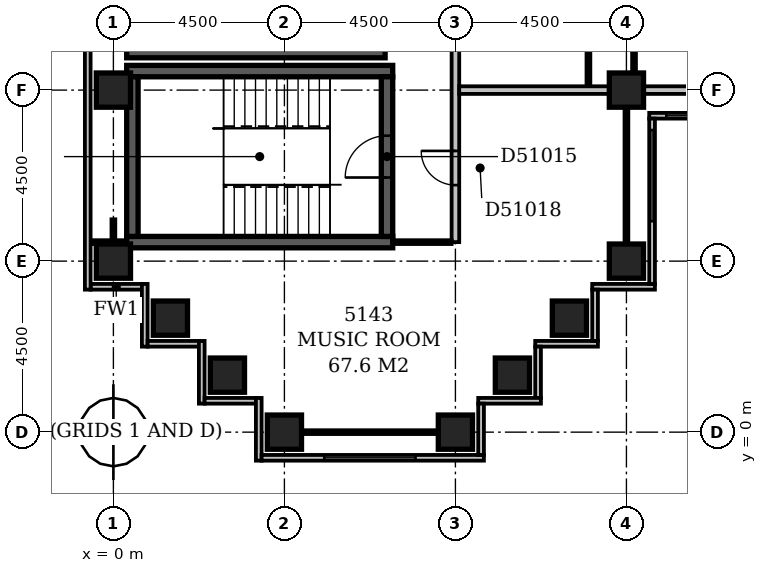
"""IFC4 building model, lengths in metres.
Left out: names, types, materials, properties, quantities, classifications, styles, units other than length and angle.
Written with IfcOpenShell. Run it as: python <this file> out.ifc"""

import sys

from ifc_helpers import new_model, si_unit, direction, frame, frame_2d, origin, origin_2d, place, context, subcontext, project, spatial, rectangle, extrude, element, fill, save


model = new_model("IFC4")
c1 = context("Model", 3, precision=1e-05, world=origin(), true_north=direction((0.0, 1.0)))
c2 = subcontext(c1, "Body", "Model", "MODEL_VIEW")
j1 = project(units=[si_unit("LENGTHUNIT", "METRE"), si_unit("PLANEANGLEUNIT", "RADIAN")], contexts=[c1])
p1 = place(None, origin())
s1 = spatial("IfcSite", under=j1, at=p1, CompositionType="ELEMENT")
p2 = place(p1, origin())
s2 = spatial("IfcBuilding", under=s1, at=p2, CompositionType="ELEMENT")
p3 = place(p2, frame((0.0, 0.0, 200.6)))
s3 = spatial("IfcBuildingStorey", under=s2, at=p3, CompositionType="ELEMENT", Elevation=200.6)
for number, where, z_axis, x_axis in (
    (1, (0.35, 5.0, -0.3), (0.0, 0.0, 1.0), (1.0, 0.0, 0.0)),
    (2, (0.35, 9.5, -0.3), (0.0, 0.0, 1.0), (1.0, 0.0, 0.0)),
):
    element("IfcWall", number, at=place(p3, frame(where, z_axis=z_axis, x_axis=x_axis)), inside=s3, PredefinedType="SHEAR", context=c2, shape_type="SweptSolid", body=[
        extrude(rectangle(XDim=7.0, YDim=0.3, at=frame_2d((3.5, 0.0))), origin(), (0.0, 0.0, 1.0), 3.6),
    ])
p4 = place(p3, frame((0.35, 10.0, -0.3), z_axis=(0.0, 0.0, 1.0), x_axis=(1.0, 0.0, 0.0)))
e3 = element("IfcWall", 3, at=p4, inside=s3, PredefinedType="SHEAR", context=c2, shape_type="SweptSolid", body=[
    extrude(rectangle(XDim=6.8, YDim=0.3, at=frame_2d((3.4, 0.0))), origin(), (0.0, 0.0, 1.0), 3.6),
])
p5 = place(p3, frame((0.5, 5.15, -0.3), z_axis=(0.0, 0.0, 1.0), x_axis=(0.0, 1.0, 0.0)))
e4 = element("IfcWall", 4, at=p5, inside=s3, PredefinedType="SHEAR", context=c2, shape_type="SweptSolid", body=[
    extrude(rectangle(XDim=4.2, YDim=0.3, at=frame_2d((2.1, 0.0))), origin(), (0.0, 0.0, 1.0), 3.6),
])
p6 = place(p3, frame((7.2, 5.15, -0.3), z_axis=(0.0, 0.0, 1.0), x_axis=(0.0, 1.0, 0.0)))
e5 = element("IfcWall", 5, at=p6, inside=s3, PredefinedType="SHEAR", context=c2, shape_type="SweptSolid", body=[
    extrude(rectangle(XDim=4.2, YDim=0.3, at=frame_2d((2.1, 0.0))), origin(), (0.0, 0.0, 1.0), 3.6),
])
p7 = place(p6, frame((1.55, 0.0, 0.3)))
e6 = element("IfcOpeningElement", 6, at=p7, cuts=e5, PredefinedType="OPENING", context=c2, shape_type="SweptSolid", body=[
    extrude(rectangle(XDim=1.1, YDim=2.1, at=frame_2d((0.55, 1.05))), frame((0.0, 0.162, 0.0), z_axis=(0.0, -1.0, 0.0), x_axis=(1.0, 0.0, 0.0)), (0.0, 0.0, 1.0), 0.324),
])
for number, where, z_axis, x_axis in (
    (7, (4.5, 0.0, -0.3), (0.0, 0.0, 1.0), (1.0, 0.0, 0.0)),
    (8, (9.0, 0.0, -0.3), (0.0, 0.0, 1.0), (1.0, 0.0, 0.0)),
    (9, (3.0, 1.5, -0.3), (0.0, 0.0, 1.0), (1.0, 0.0, 0.0)),
    (10, (10.5, 1.5, -0.3), (0.0, 0.0, 1.0), (1.0, 0.0, 0.0)),
    (11, (1.5, 3.0, -0.3), (0.0, 0.0, 1.0), (1.0, 0.0, 0.0)),
    (12, (12.0, 3.0, -0.3), (0.0, 0.0, 1.0), (1.0, 0.0, 0.0)),
    (13, (0.0, 4.5, -0.3), (0.0, 0.0, 1.0), (1.0, 0.0, 0.0)),
    (14, (13.5, 4.5, -0.3), (0.0, 0.0, 1.0), (1.0, 0.0, 0.0)),
    (15, (0.0, 9.0, -0.3), (0.0, 0.0, 1.0), (1.0, 0.0, 0.0)),
    (16, (13.5, 9.0, -0.3), (0.0, 0.0, 1.0), (1.0, 0.0, 0.0)),
):
    element("IfcColumn", number, at=place(p3, frame(where, z_axis=z_axis, x_axis=x_axis)), inside=s3, PredefinedType="COLUMN", context=c2, shape_type="SweptSolid", body=[
        extrude(rectangle(XDim=0.9, YDim=0.9, at=origin_2d()), origin(), (0.0, 0.0, 1.0), 3.6),
    ])
p8 = place(p3, frame((-0.6, 3.825, 0.0), z_axis=(0.0, 0.0, 1.0), x_axis=(1.0, 0.0, 0.0)))
e17 = element("IfcWall", 17, at=p8, inside=s3, PredefinedType="STANDARD", context=c2, shape_type="SweptSolid", body=[
    extrude(rectangle(XDim=1.35, YDim=0.15, at=frame_2d((0.675, 0.0))), origin(), (0.0, 0.0, 1.0), 2.7),
])
p9 = place(p3, frame((0.825, 3.9, 0.0), z_axis=(0.0, 0.0, 1.0), x_axis=(0.0, -1.0, 0.0)))
e18 = element("IfcWall", 18, at=p9, inside=s3, PredefinedType="STANDARD", context=c2, shape_type="SweptSolid", body=[
    extrude(rectangle(XDim=1.65, YDim=0.15, at=frame_2d((0.825, 0.0))), origin(), (0.0, 0.0, 1.0), 2.7),
])
p10 = place(p3, frame((0.9, 2.325, 0.0), z_axis=(0.0, 0.0, 1.0), x_axis=(1.0, 0.0, 0.0)))
e19 = element("IfcWall", 19, at=p10, inside=s3, PredefinedType="STANDARD", context=c2, shape_type="SweptSolid", body=[
    extrude(rectangle(XDim=1.35, YDim=0.15, at=frame_2d((0.675, 0.0))), origin(), (0.0, 0.0, 1.0), 2.7),
])
p11 = place(p3, frame((2.325, 2.4, 0.0), z_axis=(0.0, 0.0, 1.0), x_axis=(0.0, -1.0, 0.0)))
e20 = element("IfcWall", 20, at=p11, inside=s3, PredefinedType="STANDARD", context=c2, shape_type="SweptSolid", body=[
    extrude(rectangle(XDim=1.65, YDim=0.15, at=frame_2d((0.825, 0.0))), origin(), (0.0, 0.0, 1.0), 2.7),
])
p12 = place(p3, frame((2.4, 0.825, 0.0), z_axis=(0.0, 0.0, 1.0), x_axis=(1.0, 0.0, 0.0)))
e21 = element("IfcWall", 21, at=p12, inside=s3, PredefinedType="STANDARD", context=c2, shape_type="SweptSolid", body=[
    extrude(rectangle(XDim=1.35, YDim=0.15, at=frame_2d((0.675, 0.0))), origin(), (0.0, 0.0, 1.0), 2.7),
])
p13 = place(p3, frame((3.825, 0.9, 0.0), z_axis=(0.0, 0.0, 1.0), x_axis=(0.0, -1.0, 0.0)))
e22 = element("IfcWall", 22, at=p13, inside=s3, PredefinedType="STANDARD", context=c2, shape_type="SweptSolid", body=[
    extrude(rectangle(XDim=1.65, YDim=0.15, at=frame_2d((0.825, 0.0))), origin(), (0.0, 0.0, 1.0), 2.7),
])
p14 = place(p3, frame((3.9, -0.675, 0.0), z_axis=(0.0, 0.0, 1.0), x_axis=(1.0, 0.0, 0.0)))
e23 = element("IfcWall", 23, at=p14, inside=s3, PredefinedType="STANDARD", context=c2, shape_type="SweptSolid", body=[
    extrude(rectangle(XDim=5.85, YDim=0.15, at=frame_2d((2.925, 0.0))), origin(), (0.0, 0.0, 1.0), 2.7),
])
p15 = place(p14, frame((1.65, 0.0, 0.6)))
e24 = element("IfcOpeningElement", 24, at=p15, cuts=e23, PredefinedType="OPENING", context=c2, shape_type="SweptSolid", body=[
    extrude(rectangle(XDim=2.4, YDim=1.8, at=frame_2d((1.2, 0.9))), frame((0.0, 0.087, 0.0), z_axis=(0.0, -1.0, 0.0), x_axis=(1.0, 0.0, 0.0)), (0.0, 0.0, 1.0), 0.174),
])
p16 = place(p3, frame((9.675, -0.6, 0.0), z_axis=(0.0, 0.0, 1.0), x_axis=(0.0, 1.0, 0.0)))
e25 = element("IfcWall", 25, at=p16, inside=s3, PredefinedType="STANDARD", context=c2, shape_type="SweptSolid", body=[
    extrude(rectangle(XDim=1.35, YDim=0.15, at=frame_2d((0.675, 0.0))), origin(), (0.0, 0.0, 1.0), 2.7),
])
p17 = place(p3, frame((9.6, 0.825, 0.0), z_axis=(0.0, 0.0, 1.0), x_axis=(1.0, 0.0, 0.0)))
e26 = element("IfcWall", 26, at=p17, inside=s3, PredefinedType="STANDARD", context=c2, shape_type="SweptSolid", body=[
    extrude(rectangle(XDim=1.65, YDim=0.15, at=frame_2d((0.825, 0.0))), origin(), (0.0, 0.0, 1.0), 2.7),
])
p18 = place(p3, frame((11.175, 0.9, 0.0), z_axis=(0.0, 0.0, 1.0), x_axis=(0.0, 1.0, 0.0)))
e27 = element("IfcWall", 27, at=p18, inside=s3, PredefinedType="STANDARD", context=c2, shape_type="SweptSolid", body=[
    extrude(rectangle(XDim=1.35, YDim=0.15, at=frame_2d((0.675, 0.0))), origin(), (0.0, 0.0, 1.0), 2.7),
])
p19 = place(p3, frame((11.1, 2.325, 0.0), z_axis=(0.0, 0.0, 1.0), x_axis=(1.0, 0.0, 0.0)))
e28 = element("IfcWall", 28, at=p19, inside=s3, PredefinedType="STANDARD", context=c2, shape_type="SweptSolid", body=[
    extrude(rectangle(XDim=1.65, YDim=0.15, at=frame_2d((0.825, 0.0))), origin(), (0.0, 0.0, 1.0), 2.7),
])
p20 = place(p3, frame((12.675, 2.4, 0.0), z_axis=(0.0, 0.0, 1.0), x_axis=(0.0, 1.0, 0.0)))
e29 = element("IfcWall", 29, at=p20, inside=s3, PredefinedType="STANDARD", context=c2, shape_type="SweptSolid", body=[
    extrude(rectangle(XDim=1.35, YDim=0.15, at=frame_2d((0.675, 0.0))), origin(), (0.0, 0.0, 1.0), 2.7),
])
p21 = place(p3, frame((12.6, 3.825, 0.0), z_axis=(0.0, 0.0, 1.0), x_axis=(1.0, 0.0, 0.0)))
e30 = element("IfcWall", 30, at=p21, inside=s3, PredefinedType="STANDARD", context=c2, shape_type="SweptSolid", body=[
    extrude(rectangle(XDim=1.65, YDim=0.15, at=frame_2d((0.825, 0.0))), origin(), (0.0, 0.0, 1.0), 2.7),
])
p22 = place(p3, frame((14.175, 3.9, 0.0), z_axis=(0.0, 0.0, 1.0), x_axis=(0.0, 1.0, 0.0)))
e31 = element("IfcWall", 31, at=p22, inside=s3, PredefinedType="STANDARD", context=c2, shape_type="SweptSolid", body=[
    extrude(rectangle(XDim=4.35, YDim=0.15, at=frame_2d((2.175, 0.0))), origin(), (0.0, 0.0, 1.0), 2.7),
])
p23 = place(p22, frame((1.65, 0.0, 0.6)))
e32 = element("IfcOpeningElement", 32, at=p23, cuts=e31, PredefinedType="OPENING", context=c2, shape_type="SweptSolid", body=[
    extrude(rectangle(XDim=2.4, YDim=1.8, at=frame_2d((1.2, 0.9))), frame((0.0, 0.087, 0.0), z_axis=(0.0, -1.0, 0.0), x_axis=(1.0, 0.0, 0.0)), (0.0, 0.0, 1.0), 0.174),
])
p24 = place(p3, frame((14.1, 8.325, 0.0), z_axis=(0.0, 0.0, 1.0), x_axis=(1.0, 0.0, 0.0)))
e33 = element("IfcWall", 33, at=p24, inside=s3, PredefinedType="STANDARD", context=c2, shape_type="SweptSolid", body=[
    extrude(rectangle(XDim=4.65, YDim=0.15, at=frame_2d((2.325, 0.0))), origin(), (0.0, 0.0, 1.0), 2.7),
])
p25 = place(p24, frame((0.45, 0.0, 0.6)))
e34 = element("IfcOpeningElement", 34, at=p25, cuts=e33, PredefinedType="OPENING", context=c2, shape_type="SweptSolid", body=[
    extrude(rectangle(XDim=2.4, YDim=1.8, at=frame_2d((1.2, 0.9))), frame((0.0, 0.087, 0.0), z_axis=(0.0, -1.0, 0.0), x_axis=(1.0, 0.0, 0.0)), (0.0, 0.0, 1.0), 0.174),
])
p26 = place(p3, frame((-0.675, 59.1, 0.0), z_axis=(0.0, 0.0, 1.0), x_axis=(0.0, -1.0, 0.0)))
e35 = element("IfcWall", 35, at=p26, inside=s3, PredefinedType="STANDARD", context=c2, shape_type="SweptSolid", body=[
    extrude(rectangle(XDim=55.35, YDim=0.15, at=frame_2d((27.675, 0.0))), origin(), (0.0, 0.0, 1.0), 2.7),
])
p27 = place(p3, frame((4.95, 0.0, 0.0), z_axis=(0.0, 0.0, 1.0), x_axis=(1.0, 0.0, 0.0)))
e36 = element("IfcWall", 36, at=p27, inside=s3, PredefinedType="PARTITIONING", context=c2, shape_type="SweptSolid", body=[
    extrude(rectangle(XDim=3.6, YDim=0.1, at=frame_2d((1.8, 0.0))), origin(), (0.0, 0.0, 1.0), 2.7),
])
p28 = place(p3, frame((0.0, 4.95, 0.0), z_axis=(0.0, 0.0, 1.0), x_axis=(0.0, 1.0, 0.0)))
e37 = element("IfcWall", 37, at=p28, inside=s3, PredefinedType="PARTITIONING", context=c2, shape_type="SweptSolid", body=[
    extrude(rectangle(XDim=0.65, YDim=0.1, at=frame_2d((0.325, 0.0))), origin(), (0.0, 0.0, 1.0), 2.7),
])
p29 = place(p3, frame((13.5, 4.95, 0.0), z_axis=(0.0, 0.0, 1.0), x_axis=(0.0, 1.0, 0.0)))
e38 = element("IfcWall", 38, at=p29, inside=s3, PredefinedType="PARTITIONING", context=c2, shape_type="SweptSolid", body=[
    extrude(rectangle(XDim=3.6, YDim=0.1, at=frame_2d((1.8, 0.0))), origin(), (0.0, 0.0, 1.0), 2.7),
])
p30 = place(p3, frame((-0.6, 5.0, 0.0), z_axis=(0.0, 0.0, 1.0), x_axis=(1.0, 0.0, 0.0)))
e39 = element("IfcWall", 39, at=p30, inside=s3, PredefinedType="PARTITIONING", context=c2, shape_type="SweptSolid", body=[
    extrude(rectangle(XDim=0.951, YDim=0.1, at=frame_2d((0.476, 0.0))), origin(), (0.0, 0.0, 1.0), 3.3),
])
p31 = place(p3, frame((7.349, 5.0, 0.0), z_axis=(0.0, 0.0, 1.0), x_axis=(1.0, 0.0, 0.0)))
e40 = element("IfcWall", 40, at=p31, inside=s3, PredefinedType="PARTITIONING", context=c2, shape_type="SweptSolid", body=[
    extrude(rectangle(XDim=1.551, YDim=0.1, at=frame_2d((0.775, 0.0))), origin(), (0.0, 0.0, 1.0), 3.3),
])
p32 = place(p3, frame((9.0, 5.0, 0.0), z_axis=(0.0, 0.0, 1.0), x_axis=(0.0, 1.0, 0.0)))
e41 = element("IfcWall", 41, at=p32, inside=s3, PredefinedType="PARTITIONING", context=c2, shape_type="SweptSolid", body=[
    extrude(rectangle(XDim=31.0, YDim=0.2, at=frame_2d((15.5, 0.0))), origin(), (0.0, 0.0, 1.0), 3.3),
])
p33 = place(p32, frame((18.4, 0.0, 0.0)))
e42 = element("IfcOpeningElement", 42, at=p33, cuts=e41, PredefinedType="OPENING", context=c2, shape_type="SweptSolid", body=[
    extrude(rectangle(XDim=1.0, YDim=2.1, at=frame_2d((0.5, 1.05))), frame((0.0, 0.112, 0.0), z_axis=(0.0, -1.0, 0.0), x_axis=(1.0, 0.0, 0.0)), (0.0, 0.0, 1.0), 0.224),
])
p34 = place(p32, frame((11.7, 0.0, 0.0)))
e43 = element("IfcOpeningElement", 43, at=p34, cuts=e41, PredefinedType="OPENING", context=c2, shape_type="SweptSolid", body=[
    extrude(rectangle(XDim=1.0, YDim=2.1, at=frame_2d((0.5, 1.05))), frame((0.0, 0.112, 0.0), z_axis=(0.0, -1.0, 0.0), x_axis=(1.0, 0.0, 0.0)), (0.0, 0.0, 1.0), 0.224),
])
p35 = place(p32, frame((1.5, 0.0, 0.0)))
e44 = element("IfcOpeningElement", 44, at=p35, cuts=e41, PredefinedType="OPENING", context=c2, shape_type="SweptSolid", body=[
    extrude(rectangle(XDim=0.9, YDim=2.1, at=frame_2d((0.45, 1.05))), frame((0.0, 0.112, 0.0), z_axis=(0.0, -1.0, 0.0), x_axis=(1.0, 0.0, 0.0)), (0.0, 0.0, 1.0), 0.224),
])
p36 = place(p3, frame((9.1, 9.0, 0.0), z_axis=(0.0, 0.0, 1.0), x_axis=(1.0, 0.0, 0.0)))
e45 = element("IfcWall", 45, at=p36, inside=s3, PredefinedType="PARTITIONING", context=c2, shape_type="SweptSolid", body=[
    extrude(rectangle(XDim=3.95, YDim=0.2, at=frame_2d((1.975, 0.0))), origin(), (0.0, 0.0, 1.0), 3.3),
])
p37 = place(p3, frame((13.95, 9.0, 0.0), z_axis=(0.0, 0.0, 1.0), x_axis=(1.0, 0.0, 0.0)))
e46 = element("IfcWall", 46, at=p37, inside=s3, PredefinedType="PARTITIONING", context=c2, shape_type="SweptSolid", body=[
    extrude(rectangle(XDim=3.6, YDim=0.2, at=frame_2d((1.8, 0.0))), origin(), (0.0, 0.0, 1.0), 2.7),
])
p38 = place(p3, frame((12.5, 9.1, 0.0), z_axis=(0.0, 0.0, 1.0), x_axis=(0.0, 1.0, 0.0)))
e47 = element("IfcWall", 47, at=p38, inside=s3, PredefinedType="PARTITIONING", context=c2, shape_type="SweptSolid", body=[
    extrude(rectangle(XDim=7.3, YDim=0.1, at=frame_2d((3.65, 0.0))), origin(), (0.0, 0.0, 1.0), 3.3),
])
p39 = place(p38, frame((5.7, 0.0, 0.0)))
e48 = element("IfcOpeningElement", 48, at=p39, cuts=e47, PredefinedType="OPENING", context=c2, shape_type="SweptSolid", body=[
    extrude(rectangle(XDim=0.8, YDim=2.1, at=frame_2d((0.4, 1.05))), frame((0.0, 0.062, 0.0), z_axis=(0.0, -1.0, 0.0), x_axis=(1.0, 0.0, 0.0)), (0.0, 0.0, 1.0), 0.124),
])
p40 = place(p38, frame((1.95, 0.0, 0.0)))
e49 = element("IfcOpeningElement", 49, at=p40, cuts=e47, PredefinedType="OPENING", context=c2, shape_type="SweptSolid", body=[
    extrude(rectangle(XDim=0.9, YDim=2.1, at=frame_2d((0.45, 1.05))), frame((0.0, 0.062, 0.0), z_axis=(0.0, -1.0, 0.0), x_axis=(1.0, 0.0, 0.0)), (0.0, 0.0, 1.0), 0.124),
])
p41 = place(p3, frame((13.7, 9.45, 0.0), z_axis=(0.0, 0.0, 1.0), x_axis=(0.0, 1.0, 0.0)))
e50 = element("IfcWall", 50, at=p41, inside=s3, PredefinedType="PARTITIONING", context=c2, shape_type="SweptSolid", body=[
    extrude(rectangle(XDim=8.45, YDim=0.1, at=frame_2d((4.225, 0.0))), origin(), (0.0, 0.0, 1.0), 3.3),
])
p42 = place(p41, frame((1.35, 0.0, 0.0)))
e51 = element("IfcOpeningElement", 51, at=p42, cuts=e50, PredefinedType="OPENING", context=c2, shape_type="SweptSolid", body=[
    extrude(rectangle(XDim=0.9, YDim=2.1, at=frame_2d((0.45, 1.05))), frame((0.0, 0.062, 0.0), z_axis=(0.0, -1.0, 0.0), x_axis=(1.0, 0.0, 0.0)), (0.0, 0.0, 1.0), 0.124),
])
p43 = place(p41, frame((5.85, 0.0, 0.0)))
e52 = element("IfcOpeningElement", 52, at=p43, cuts=e50, PredefinedType="OPENING", context=c2, shape_type="SweptSolid", body=[
    extrude(rectangle(XDim=0.9, YDim=2.1, at=frame_2d((0.45, 1.05))), frame((0.0, 0.062, 0.0), z_axis=(0.0, -1.0, 0.0), x_axis=(1.0, 0.0, 0.0)), (0.0, 0.0, 1.0), 0.124),
])
p44 = place(p15, origin())
e53 = element("IfcWindow", 53, at=p44, inside=s3, PartitioningType="SINGLE_PANEL", PredefinedType="WINDOW", context=c2, shape_type="SweptSolid", body=[
    extrude(rectangle(XDim=2.4, YDim=1.8, at=frame_2d((1.2, 0.9))), frame((0.0, 0.03, 0.0), z_axis=(0.0, -1.0, 0.0), x_axis=(1.0, 0.0, 0.0)), (0.0, 0.0, 1.0), 0.06),
])
fill(e24, e53)
p45 = place(p23, origin())
e54 = element("IfcWindow", 54, at=p45, inside=s3, PartitioningType="SINGLE_PANEL", PredefinedType="WINDOW", context=c2, shape_type="SweptSolid", body=[
    extrude(rectangle(XDim=2.4, YDim=1.8, at=frame_2d((1.2, 0.9))), frame((0.0, 0.03, 0.0), z_axis=(0.0, -1.0, 0.0), x_axis=(1.0, 0.0, 0.0)), (0.0, 0.0, 1.0), 0.06),
])
fill(e32, e54)
p46 = place(p25, origin())
e55 = element("IfcWindow", 55, at=p46, inside=s3, PartitioningType="SINGLE_PANEL", PredefinedType="WINDOW", context=c2, shape_type="SweptSolid", body=[
    extrude(rectangle(XDim=2.4, YDim=1.8, at=frame_2d((1.2, 0.9))), frame((0.0, 0.03, 0.0), z_axis=(0.0, -1.0, 0.0), x_axis=(1.0, 0.0, 0.0)), (0.0, 0.0, 1.0), 0.06),
])
fill(e34, e55)
p47 = place(p7, origin())
e56 = element("IfcDoor", 56, at=p47, inside=s3, OperationType="SINGLE_SWING_LEFT", PredefinedType="DOOR", context=c2, shape_type="SweptSolid", body=[
    extrude(rectangle(XDim=1.1, YDim=2.1, at=frame_2d((0.55, 1.05))), frame((0.0, 0.025, 0.0), z_axis=(0.0, -1.0, 0.0), x_axis=(1.0, 0.0, 0.0)), (0.0, 0.0, 1.0), 0.05),
])
fill(e6, e56)
p48 = place(p35, frame((0.9, 0.0, 0.0), z_axis=(0.0, 0.0, 1.0), x_axis=(-1.0, 0.0, 0.0)))
e57 = element("IfcDoor", 57, at=p48, inside=s3, OperationType="SINGLE_SWING_LEFT", PredefinedType="DOOR", context=c2, shape_type="SweptSolid", body=[
    extrude(rectangle(XDim=0.9, YDim=2.1, at=frame_2d((0.45, 1.05))), frame((0.0, 0.025, 0.0), z_axis=(0.0, -1.0, 0.0), x_axis=(1.0, 0.0, 0.0)), (0.0, 0.0, 1.0), 0.05),
])
fill(e44, e57)
save(model, sys.argv[1])
